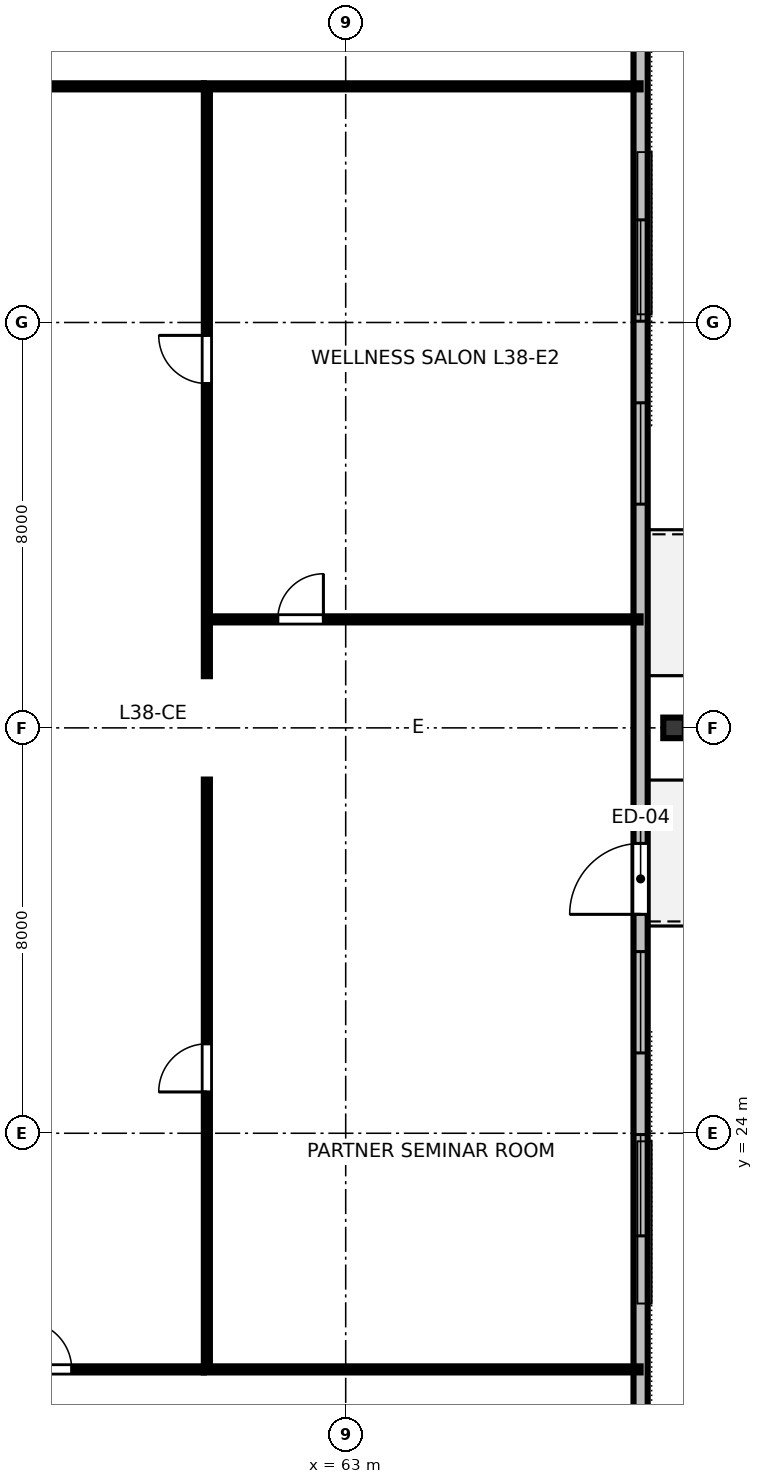
"""IFC4 building model, lengths in metres.
Left out: names, types, materials, properties, quantities, classifications, styles, units other than length and angle.
Written with IfcOpenShell. Run it as: python <this file> out.ifc"""

import sys

from ifc_helpers import new_model, si_unit, direction, frame, frame_2d, origin, origin_2d, place, context, subcontext, project, spatial, rectangle, i_section, extrude, element, fill, save


model = new_model("IFC4")
c1 = context("Model", 3, precision=1e-05, world=origin(), true_north=direction((0.0, 1.0)))
c2 = subcontext(c1, "Body", "Model", "MODEL_VIEW")
j1 = project(units=[si_unit("LENGTHUNIT", "METRE"), si_unit("PLANEANGLEUNIT", "RADIAN")], contexts=[c1])
p1 = place(None, origin())
s1 = spatial("IfcSite", under=j1, at=p1, CompositionType="ELEMENT")
p2 = place(p1, origin())
s2 = spatial("IfcBuilding", under=s1, at=p2, CompositionType="ELEMENT")
p3 = place(p2, frame((0.0, 0.0, 145.6)))
s3 = spatial("IfcBuildingStorey", under=s2, at=p3, CompositionType="ELEMENT", Elevation=145.6)
p4 = place(p3, frame((69.48, 32.0, 0.0), z_axis=(0.089001216718, 0.0, 0.996031517284), x_axis=(-0.996031517284, 0.0, 0.089001216718)))
e1 = element("IfcColumn", 1, at=p4, inside=s3, PredefinedType="COLUMN", context=c2, shape_type="SweptSolid", body=[
    extrude(i_section(OverallWidth=0.406, OverallDepth=0.425, WebThickness=0.033, FlangeThickness=0.052, FilletRadius=0.025, at=origin_2d()), origin(), (0.0, 0.0, 1.0), 3.371),
])
p5 = place(p3, frame((68.82, 16.46, 0.0), z_axis=(0.0, 0.0, 1.0), x_axis=(0.0, 1.0, 0.0)))
e2 = element("IfcWall", 2, at=p5, inside=s3, PredefinedType="STANDARD", context=c2, shape_type="SweptSolid", body=[
    extrude(rectangle(XDim=31.08, YDim=0.28, at=frame_2d((15.54, 0.0))), origin(), (0.0, 0.0, 1.0), 3.36),
])
p6 = place(p5, frame((11.86, 0.0, 0.0)))
e3 = element("IfcOpeningElement", 3, at=p6, cuts=e2, PredefinedType="OPENING", context=c2, shape_type="SweptSolid", body=[
    extrude(rectangle(XDim=1.4, YDim=2.15, at=frame_2d((0.7, 1.075))), frame((0.0, 0.15, 0.0), z_axis=(0.0, -1.0, 0.0), x_axis=(1.0, 0.0, 0.0)), (0.0, 0.0, 1.0), 0.3),
])
p7 = place(p5, frame((5.515, 0.0, 0.8)))
e4 = element("IfcOpeningElement", 4, at=p7, cuts=e2, PredefinedType="OPENING", context=c2, shape_type="SweptSolid", body=[
    extrude(rectangle(XDim=2.0, YDim=1.95, at=frame_2d((1.0, 0.975))), frame((0.0, 0.15, 0.0), z_axis=(0.0, -1.0, 0.0), x_axis=(1.0, 0.0, 0.0)), (0.0, 0.0, 1.0), 0.3),
])
p8 = place(p5, frame((9.125, 0.0, 0.8)))
e5 = element("IfcOpeningElement", 5, at=p8, cuts=e2, PredefinedType="OPENING", context=c2, shape_type="SweptSolid", body=[
    extrude(rectangle(XDim=2.0, YDim=1.95, at=frame_2d((1.0, 0.975))), frame((0.0, 0.15, 0.0), z_axis=(0.0, -1.0, 0.0), x_axis=(1.0, 0.0, 0.0)), (0.0, 0.0, 1.0), 0.3),
])
p9 = place(p5, frame((19.955, 0.0, 0.8)))
e6 = element("IfcOpeningElement", 6, at=p9, cuts=e2, PredefinedType="OPENING", context=c2, shape_type="SweptSolid", body=[
    extrude(rectangle(XDim=2.0, YDim=1.95, at=frame_2d((1.0, 0.975))), frame((0.0, 0.15, 0.0), z_axis=(0.0, -1.0, 0.0), x_axis=(1.0, 0.0, 0.0)), (0.0, 0.0, 1.0), 0.3),
])
p10 = place(p5, frame((23.565, 0.0, 0.8)))
e7 = element("IfcOpeningElement", 7, at=p10, cuts=e2, PredefinedType="OPENING", context=c2, shape_type="SweptSolid", body=[
    extrude(rectangle(XDim=2.0, YDim=1.95, at=frame_2d((1.0, 0.975))), frame((0.0, 0.15, 0.0), z_axis=(0.0, -1.0, 0.0), x_axis=(1.0, 0.0, 0.0)), (0.0, 0.0, 1.0), 0.3),
])
p11 = place(p3, frame((31.8, 19.34, 0.0), z_axis=(0.0, 0.0, 1.0), x_axis=(1.0, 0.0, 0.0)))
e8 = element("IfcWall", 8, at=p11, inside=s3, PredefinedType="PARTITIONING", context=c2, shape_type="SweptSolid", body=[
    extrude(rectangle(XDim=28.4, YDim=0.12, at=frame_2d((14.2, 0.0))), origin(), (0.0, 0.0, 1.0), 2.64),
])
p12 = place(p11, frame((3.771, 0.0, 0.0)))
e9 = element("IfcOpeningElement", 9, at=p12, cuts=e8, PredefinedType="OPENING", context=c2, shape_type="SweptSolid", body=[
    extrude(rectangle(XDim=0.95, YDim=2.15, at=frame_2d((0.475, 1.075))), frame((0.0, 0.07, 0.0), z_axis=(0.0, -1.0, 0.0), x_axis=(1.0, 0.0, 0.0)), (0.0, 0.0, 1.0), 0.14),
])
p13 = place(p11, frame((10.068, 0.0, 0.0)))
e10 = element("IfcOpeningElement", 10, at=p13, cuts=e8, PredefinedType="OPENING", context=c2, shape_type="SweptSolid", body=[
    extrude(rectangle(XDim=0.95, YDim=2.15, at=frame_2d((0.475, 1.075))), frame((0.0, 0.07, 0.0), z_axis=(0.0, -1.0, 0.0), x_axis=(1.0, 0.0, 0.0)), (0.0, 0.0, 1.0), 0.14),
])
p14 = place(p11, frame((13.828, 0.0, 0.0)))
e11 = element("IfcOpeningElement", 11, at=p14, cuts=e8, PredefinedType="OPENING", context=c2, shape_type="SweptSolid", body=[
    extrude(rectangle(XDim=0.95, YDim=2.15, at=frame_2d((0.475, 1.075))), frame((0.0, 0.07, 0.0), z_axis=(0.0, -1.0, 0.0), x_axis=(1.0, 0.0, 0.0)), (0.0, 0.0, 1.0), 0.14),
])
p15 = place(p11, frame((18.648, 0.0, 0.0)))
e12 = element("IfcOpeningElement", 12, at=p15, cuts=e8, PredefinedType="OPENING", context=c2, shape_type="SweptSolid", body=[
    extrude(rectangle(XDim=0.95, YDim=2.15, at=frame_2d((0.475, 1.075))), frame((0.0, 0.07, 0.0), z_axis=(0.0, -1.0, 0.0), x_axis=(1.0, 0.0, 0.0)), (0.0, 0.0, 1.0), 0.14),
])
p16 = place(p11, frame((24.842, 0.0, 0.0)))
e13 = element("IfcOpeningElement", 13, at=p16, cuts=e8, PredefinedType="OPENING", context=c2, shape_type="SweptSolid", body=[
    extrude(rectangle(XDim=0.95, YDim=2.15, at=frame_2d((0.475, 1.075))), frame((0.0, 0.07, 0.0), z_axis=(0.0, -1.0, 0.0), x_axis=(1.0, 0.0, 0.0)), (0.0, 0.0, 1.0), 0.14),
])
p17 = place(p3, frame((31.8, 44.66, 0.0), z_axis=(0.0, 0.0, 1.0), x_axis=(1.0, 0.0, 0.0)))
e14 = element("IfcWall", 14, at=p17, inside=s3, PredefinedType="PARTITIONING", context=c2, shape_type="SweptSolid", body=[
    extrude(rectangle(XDim=28.4, YDim=0.12, at=frame_2d((14.2, 0.0))), origin(), (0.0, 0.0, 1.0), 2.64),
])
p18 = place(p17, frame((3.705, 0.0, 0.0)))
e15 = element("IfcOpeningElement", 15, at=p18, cuts=e14, PredefinedType="OPENING", context=c2, shape_type="SweptSolid", body=[
    extrude(rectangle(XDim=0.95, YDim=2.15, at=frame_2d((0.475, 1.075))), frame((0.0, 0.07, 0.0), z_axis=(0.0, -1.0, 0.0), x_axis=(1.0, 0.0, 0.0)), (0.0, 0.0, 1.0), 0.14),
])
p19 = place(p17, frame((11.836, 0.0, 0.0)))
e16 = element("IfcOpeningElement", 16, at=p19, cuts=e14, PredefinedType="OPENING", context=c2, shape_type="SweptSolid", body=[
    extrude(rectangle(XDim=0.95, YDim=2.15, at=frame_2d((0.475, 1.075))), frame((0.0, 0.07, 0.0), z_axis=(0.0, -1.0, 0.0), x_axis=(1.0, 0.0, 0.0)), (0.0, 0.0, 1.0), 0.14),
])
p20 = place(p17, frame((21.856, 0.0, 0.0)))
e17 = element("IfcOpeningElement", 17, at=p20, cuts=e14, PredefinedType="OPENING", context=c2, shape_type="SweptSolid", body=[
    extrude(rectangle(XDim=0.95, YDim=2.15, at=frame_2d((0.475, 1.075))), frame((0.0, 0.07, 0.0), z_axis=(0.0, -1.0, 0.0), x_axis=(1.0, 0.0, 0.0)), (0.0, 0.0, 1.0), 0.14),
])
p21 = place(p3, frame((60.26, 34.141, 0.0), z_axis=(0.0, 0.0, 1.0), x_axis=(1.0, 0.0, 0.0)))
e18 = element("IfcWall", 18, at=p21, inside=s3, PredefinedType="PARTITIONING", context=c2, shape_type="SweptSolid", body=[
    extrude(rectangle(XDim=8.56, YDim=0.12, at=frame_2d((4.28, 0.0))), origin(), (0.0, 0.0, 1.0), 2.64),
])
p22 = place(p21, frame((1.4, 0.0, 0.0)))
e19 = element("IfcOpeningElement", 19, at=p22, cuts=e18, PredefinedType="OPENING", context=c2, shape_type="SweptSolid", body=[
    extrude(rectangle(XDim=0.9, YDim=2.15, at=frame_2d((0.45, 1.075))), frame((0.0, 0.07, 0.0), z_axis=(0.0, -1.0, 0.0), x_axis=(1.0, 0.0, 0.0)), (0.0, 0.0, 1.0), 0.14),
])
p23 = place(p3, frame((60.26, 19.4, 0.0), z_axis=(0.0, 0.0, 1.0), x_axis=(0.0, 1.0, 0.0)))
e20 = element("IfcWall", 20, at=p23, inside=s3, PredefinedType="PARTITIONING", context=c2, shape_type="SweptSolid", body=[
    extrude(rectangle(XDim=11.58, YDim=0.12, at=frame_2d((5.79, 0.0))), origin(), (0.0, 0.0, 1.0), 2.64),
])
p24 = place(p23, frame((5.415, 0.0, 0.0)))
e21 = element("IfcOpeningElement", 21, at=p24, cuts=e20, PredefinedType="OPENING", context=c2, shape_type="SweptSolid", body=[
    extrude(rectangle(XDim=0.95, YDim=2.15, at=frame_2d((0.475, 1.075))), frame((0.0, 0.07, 0.0), z_axis=(0.0, -1.0, 0.0), x_axis=(1.0, 0.0, 0.0)), (0.0, 0.0, 1.0), 0.14),
])
p25 = place(p3, frame((60.26, 33.02, 0.0), z_axis=(0.0, 0.0, 1.0), x_axis=(0.0, 1.0, 0.0)))
e22 = element("IfcWall", 22, at=p25, inside=s3, PredefinedType="PARTITIONING", context=c2, shape_type="SweptSolid", body=[
    extrude(rectangle(XDim=11.58, YDim=0.12, at=frame_2d((5.79, 0.0))), origin(), (0.0, 0.0, 1.0), 2.64),
])
p26 = place(p25, frame((5.775, 0.0, 0.0)))
e23 = element("IfcOpeningElement", 23, at=p26, cuts=e22, PredefinedType="OPENING", context=c2, shape_type="SweptSolid", body=[
    extrude(rectangle(XDim=0.95, YDim=2.15, at=frame_2d((0.475, 1.075))), frame((0.0, 0.07, 0.0), z_axis=(0.0, -1.0, 0.0), x_axis=(1.0, 0.0, 0.0)), (0.0, 0.0, 1.0), 0.14),
])
for number, where, z_axis, x_axis in (
    (24, (60.2, 19.34, 0.0), (0.0, 0.0, 1.0), (1.0, 0.0, 0.0)),
    (25, (60.2, 44.66, 0.0), (0.0, 0.0, 1.0), (1.0, 0.0, 0.0)),
):
    element("IfcWall", number, at=place(p3, frame(where, z_axis=z_axis, x_axis=x_axis)), inside=s3, PredefinedType="PARTITIONING", context=c2, shape_type="SweptSolid", body=[
        extrude(rectangle(XDim=8.62, YDim=0.12, at=frame_2d((4.31, 0.0))), origin(), (0.0, 0.0, 1.0), 2.64),
    ])
p27 = place(p6, origin())
e26 = element("IfcDoor", 26, at=p27, inside=s3, OperationType="SINGLE_SWING_LEFT", PredefinedType="DOOR", context=c2, shape_type="SweptSolid", body=[
    extrude(rectangle(XDim=1.4, YDim=2.15, at=frame_2d((0.7, 1.075))), frame((0.0, 0.025, 0.0), z_axis=(0.0, -1.0, 0.0), x_axis=(1.0, 0.0, 0.0)), (0.0, 0.0, 1.0), 0.05),
])
fill(e3, e26)
p28 = place(p7, origin())
e27 = element("IfcWindow", 27, at=p28, inside=s3, PartitioningType="SINGLE_PANEL", PredefinedType="WINDOW", context=c2, shape_type="SweptSolid", body=[
    extrude(rectangle(XDim=2.0, YDim=1.95, at=frame_2d((1.0, 0.975))), frame((0.0, 0.03, 0.0), z_axis=(0.0, -1.0, 0.0), x_axis=(1.0, 0.0, 0.0)), (0.0, 0.0, 1.0), 0.06),
])
fill(e4, e27)
p29 = place(p8, origin())
e28 = element("IfcWindow", 28, at=p29, inside=s3, PartitioningType="SINGLE_PANEL", PredefinedType="WINDOW", context=c2, shape_type="SweptSolid", body=[
    extrude(rectangle(XDim=2.0, YDim=1.95, at=frame_2d((1.0, 0.975))), frame((0.0, 0.03, 0.0), z_axis=(0.0, -1.0, 0.0), x_axis=(1.0, 0.0, 0.0)), (0.0, 0.0, 1.0), 0.06),
])
fill(e5, e28)
p30 = place(p9, origin())
e29 = element("IfcWindow", 29, at=p30, inside=s3, PartitioningType="SINGLE_PANEL", PredefinedType="WINDOW", context=c2, shape_type="SweptSolid", body=[
    extrude(rectangle(XDim=2.0, YDim=1.95, at=frame_2d((1.0, 0.975))), frame((0.0, 0.03, 0.0), z_axis=(0.0, -1.0, 0.0), x_axis=(1.0, 0.0, 0.0)), (0.0, 0.0, 1.0), 0.06),
])
fill(e6, e29)
p31 = place(p10, origin())
e30 = element("IfcWindow", 30, at=p31, inside=s3, PartitioningType="SINGLE_PANEL", PredefinedType="WINDOW", context=c2, shape_type="SweptSolid", body=[
    extrude(rectangle(XDim=2.0, YDim=1.95, at=frame_2d((1.0, 0.975))), frame((0.0, 0.03, 0.0), z_axis=(0.0, -1.0, 0.0), x_axis=(1.0, 0.0, 0.0)), (0.0, 0.0, 1.0), 0.06),
])
fill(e7, e30)
p32 = place(p16, origin())
e31 = element("IfcDoor", 31, at=p32, inside=s3, OperationType="SINGLE_SWING_LEFT", PredefinedType="DOOR", context=c2, shape_type="SweptSolid", body=[
    extrude(rectangle(XDim=0.95, YDim=2.15, at=frame_2d((0.475, 1.075))), frame((0.0, 0.025, 0.0), z_axis=(0.0, -1.0, 0.0), x_axis=(1.0, 0.0, 0.0)), (0.0, 0.0, 1.0), 0.05),
])
fill(e13, e31)
p33 = place(p22, origin())
e32 = element("IfcDoor", 32, at=p33, inside=s3, OperationType="SINGLE_SWING_RIGHT", PredefinedType="DOOR", context=c2, shape_type="SweptSolid", body=[
    extrude(rectangle(XDim=0.9, YDim=2.15, at=frame_2d((0.45, 1.075))), frame((0.0, 0.025, 0.0), z_axis=(0.0, -1.0, 0.0), x_axis=(1.0, 0.0, 0.0)), (0.0, 0.0, 1.0), 0.05),
])
fill(e19, e32)
p34 = place(p24, origin())
e33 = element("IfcDoor", 33, at=p34, inside=s3, OperationType="SINGLE_SWING_LEFT", PredefinedType="DOOR", context=c2, shape_type="SweptSolid", body=[
    extrude(rectangle(XDim=0.95, YDim=2.15, at=frame_2d((0.475, 1.075))), frame((0.0, 0.025, 0.0), z_axis=(0.0, -1.0, 0.0), x_axis=(1.0, 0.0, 0.0)), (0.0, 0.0, 1.0), 0.05),
])
fill(e21, e33)
p35 = place(p26, origin())
e34 = element("IfcDoor", 34, at=p35, inside=s3, OperationType="SINGLE_SWING_RIGHT", PredefinedType="DOOR", context=c2, shape_type="SweptSolid", body=[
    extrude(rectangle(XDim=0.95, YDim=2.15, at=frame_2d((0.475, 1.075))), frame((0.0, 0.025, 0.0), z_axis=(0.0, -1.0, 0.0), x_axis=(1.0, 0.0, 0.0)), (0.0, 0.0, 1.0), 0.05),
])
fill(e23, e34)
save(model, sys.argv[1])
